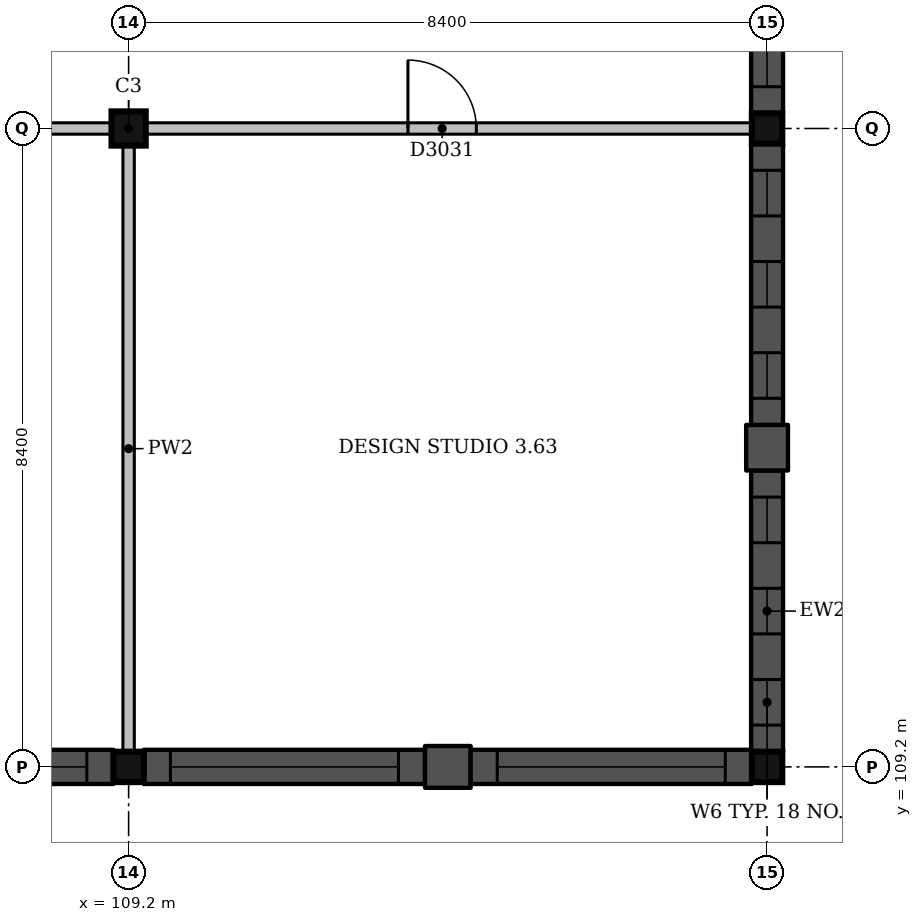
"""IFC4 building model, lengths in metres.
Left out: names, types, materials, properties, quantities, classifications, styles, units other than length and angle.
Written with IfcOpenShell. Run it as: python <this file> out.ifc"""

import sys

from ifc_helpers import new_model, si_unit, direction, frame, frame_2d, origin, origin_2d, place, context, subcontext, project, spatial, rectangle, extrude, element, fill, save


model = new_model("IFC4")
c1 = context("Model", 3, precision=1e-05, world=origin(), true_north=direction((0.0, 1.0)))
c2 = subcontext(c1, "Body", "Model", "MODEL_VIEW")
j1 = project(units=[si_unit("LENGTHUNIT", "METRE"), si_unit("PLANEANGLEUNIT", "RADIAN")], contexts=[c1])
p1 = place(None, origin())
s1 = spatial("IfcSite", under=j1, at=p1, CompositionType="ELEMENT")
p2 = place(p1, origin())
s2 = spatial("IfcBuilding", under=s1, at=p2, CompositionType="ELEMENT")
p3 = place(p2, frame((0.0, 0.0, 13.5)))
s3 = spatial("IfcBuildingStorey", under=s2, at=p3, CompositionType="ELEMENT", Elevation=13.5)
p4 = place(p3, frame((109.2, 109.2, 0.0), z_axis=(0.0, 0.0, 1.0), x_axis=(1.0, 0.0, 0.0)))
e1 = element("IfcColumn", 1, at=p4, inside=s3, PredefinedType="COLUMN", context=c2, shape_type="SweptSolid", body=[
    extrude(rectangle(XDim=0.4, YDim=0.4, at=origin_2d()), origin(), (0.0, 0.0, 1.0), 4.5),
])
p5 = place(p3, frame((109.2, 117.6, 0.0), z_axis=(0.0, 0.0, 1.0), x_axis=(1.0, 0.0, 0.0)))
e2 = element("IfcColumn", 2, at=p5, inside=s3, PredefinedType="COLUMN", context=c2, shape_type="SweptSolid", body=[
    extrude(rectangle(XDim=0.45, YDim=0.45, at=origin_2d()), origin(), (0.0, 0.0, 1.0), 4.5),
])
for number, where, z_axis, x_axis in (
    (3, (117.6, 109.2, 0.0), (0.0, 0.0, 1.0), (1.0, 0.0, 0.0)),
    (4, (117.6, 117.6, 0.0), (0.0, 0.0, 1.0), (1.0, 0.0, 0.0)),
):
    element("IfcColumn", number, at=place(p3, frame(where, z_axis=z_axis, x_axis=x_axis)), inside=s3, PredefinedType="COLUMN", context=c2, shape_type="SweptSolid", body=[
        extrude(rectangle(XDim=0.4, YDim=0.4, at=origin_2d()), origin(), (0.0, 0.0, 1.0), 4.5),
    ])
p6 = place(p3, frame((105.3, 109.2, 0.0), z_axis=(0.0, 0.0, 1.0), x_axis=(1.0, 0.0, 0.0)))
e5 = element("IfcWall", 5, at=p6, inside=s3, PredefinedType="SOLIDWALL", context=c2, shape_type="SweptSolid", body=[
    extrude(rectangle(XDim=3.7, YDim=0.45, at=frame_2d((1.85, 0.0))), origin(), (0.0, 0.0, 1.0), 3.45),
])
p7 = place(p6, frame((0.35, 0.0, 0.9)))
e6 = element("IfcOpeningElement", 6, at=p7, cuts=e5, PredefinedType="OPENING", context=c2, shape_type="SweptSolid", body=[
    extrude(rectangle(XDim=3.0, YDim=2.1, at=frame_2d((1.5, 1.05))), frame((0.0, 0.235, 0.0), z_axis=(0.0, -1.0, 0.0), x_axis=(1.0, 0.0, 0.0)), (0.0, 0.0, 1.0), 0.47),
])
p8 = place(p3, frame((109.4, 109.2, 0.0), z_axis=(0.0, 0.0, 1.0), x_axis=(1.0, 0.0, 0.0)))
e7 = element("IfcWall", 7, at=p8, inside=s3, PredefinedType="SOLIDWALL", context=c2, shape_type="SweptSolid", body=[
    extrude(rectangle(XDim=3.7, YDim=0.45, at=frame_2d((1.85, 0.0))), origin(), (0.0, 0.0, 1.0), 3.45),
])
p9 = place(p8, frame((0.35, 0.0, 0.9)))
e8 = element("IfcOpeningElement", 8, at=p9, cuts=e7, PredefinedType="OPENING", context=c2, shape_type="SweptSolid", body=[
    extrude(rectangle(XDim=3.0, YDim=2.1, at=frame_2d((1.5, 1.05))), frame((0.0, 0.235, 0.0), z_axis=(0.0, -1.0, 0.0), x_axis=(1.0, 0.0, 0.0)), (0.0, 0.0, 1.0), 0.47),
])
p10 = place(p3, frame((113.1, 109.2, 0.0), z_axis=(0.0, 0.0, 1.0), x_axis=(1.0, 0.0, 0.0)))
e9 = element("IfcWall", 9, at=p10, inside=s3, PredefinedType="SOLIDWALL", context=c2, shape_type="SweptSolid", body=[
    extrude(rectangle(XDim=0.6, YDim=0.55, at=frame_2d((0.3, 0.0))), origin(), (0.0, 0.0, 1.0), 3.45),
])
p11 = place(p3, frame((113.7, 109.2, 0.0), z_axis=(0.0, 0.0, 1.0), x_axis=(1.0, 0.0, 0.0)))
e10 = element("IfcWall", 10, at=p11, inside=s3, PredefinedType="SOLIDWALL", context=c2, shape_type="SweptSolid", body=[
    extrude(rectangle(XDim=3.7, YDim=0.45, at=frame_2d((1.85, 0.0))), origin(), (0.0, 0.0, 1.0), 3.45),
])
p12 = place(p11, frame((0.35, 0.0, 0.9)))
e11 = element("IfcOpeningElement", 11, at=p12, cuts=e10, PredefinedType="OPENING", context=c2, shape_type="SweptSolid", body=[
    extrude(rectangle(XDim=3.0, YDim=2.1, at=frame_2d((1.5, 1.05))), frame((0.0, 0.235, 0.0), z_axis=(0.0, -1.0, 0.0), x_axis=(1.0, 0.0, 0.0)), (0.0, 0.0, 1.0), 0.47),
])
p13 = place(p3, frame((117.6, 109.4, 0.0), z_axis=(0.0, 0.0, 1.0), x_axis=(0.0, 1.0, 0.0)))
e12 = element("IfcWall", 12, at=p13, inside=s3, PredefinedType="SOLIDWALL", context=c2, shape_type="SweptSolid", body=[
    extrude(rectangle(XDim=3.7, YDim=0.42, at=frame_2d((1.85, 0.0))), origin(), (0.0, 0.0, 1.0), 4.2),
])
p14 = place(p13, frame((0.35, 0.0, 1.0)))
e13 = element("IfcOpeningElement", 13, at=p14, cuts=e12, PredefinedType="OPENING", context=c2, shape_type="SweptSolid", body=[
    extrude(rectangle(XDim=0.6, YDim=2.1, at=frame_2d((0.3, 1.05))), frame((0.0, 0.22, 0.0), z_axis=(0.0, -1.0, 0.0), x_axis=(1.0, 0.0, 0.0)), (0.0, 0.0, 1.0), 0.44),
])
p15 = place(p13, frame((1.55, 0.0, 1.0)))
e14 = element("IfcOpeningElement", 14, at=p15, cuts=e12, PredefinedType="OPENING", context=c2, shape_type="SweptSolid", body=[
    extrude(rectangle(XDim=0.6, YDim=2.1, at=frame_2d((0.3, 1.05))), frame((0.0, 0.22, 0.0), z_axis=(0.0, -1.0, 0.0), x_axis=(1.0, 0.0, 0.0)), (0.0, 0.0, 1.0), 0.44),
])
p16 = place(p13, frame((2.75, 0.0, 1.0)))
e15 = element("IfcOpeningElement", 15, at=p16, cuts=e12, PredefinedType="OPENING", context=c2, shape_type="SweptSolid", body=[
    extrude(rectangle(XDim=0.6, YDim=2.1, at=frame_2d((0.3, 1.05))), frame((0.0, 0.22, 0.0), z_axis=(0.0, -1.0, 0.0), x_axis=(1.0, 0.0, 0.0)), (0.0, 0.0, 1.0), 0.44),
])
p17 = place(p3, frame((117.6, 113.1, 0.0), z_axis=(0.0, 0.0, 1.0), x_axis=(0.0, 1.0, 0.0)))
e16 = element("IfcWall", 16, at=p17, inside=s3, PredefinedType="SOLIDWALL", context=c2, shape_type="SweptSolid", body=[
    extrude(rectangle(XDim=0.6, YDim=0.55, at=frame_2d((0.3, 0.0))), origin(), (0.0, 0.0, 1.0), 4.2),
])
p18 = place(p3, frame((117.6, 113.7, 0.0), z_axis=(0.0, 0.0, 1.0), x_axis=(0.0, 1.0, 0.0)))
e17 = element("IfcWall", 17, at=p18, inside=s3, PredefinedType="SOLIDWALL", context=c2, shape_type="SweptSolid", body=[
    extrude(rectangle(XDim=3.7, YDim=0.42, at=frame_2d((1.85, 0.0))), origin(), (0.0, 0.0, 1.0), 4.2),
])
p19 = place(p18, frame((0.35, 0.0, 1.0)))
e18 = element("IfcOpeningElement", 18, at=p19, cuts=e17, PredefinedType="OPENING", context=c2, shape_type="SweptSolid", body=[
    extrude(rectangle(XDim=0.6, YDim=2.1, at=frame_2d((0.3, 1.05))), frame((0.0, 0.22, 0.0), z_axis=(0.0, -1.0, 0.0), x_axis=(1.0, 0.0, 0.0)), (0.0, 0.0, 1.0), 0.44),
])
p20 = place(p18, frame((1.55, 0.0, 1.0)))
e19 = element("IfcOpeningElement", 19, at=p20, cuts=e17, PredefinedType="OPENING", context=c2, shape_type="SweptSolid", body=[
    extrude(rectangle(XDim=0.6, YDim=2.1, at=frame_2d((0.3, 1.05))), frame((0.0, 0.22, 0.0), z_axis=(0.0, -1.0, 0.0), x_axis=(1.0, 0.0, 0.0)), (0.0, 0.0, 1.0), 0.44),
])
p21 = place(p18, frame((2.75, 0.0, 1.0)))
e20 = element("IfcOpeningElement", 20, at=p21, cuts=e17, PredefinedType="OPENING", context=c2, shape_type="SweptSolid", body=[
    extrude(rectangle(XDim=0.6, YDim=2.1, at=frame_2d((0.3, 1.05))), frame((0.0, 0.22, 0.0), z_axis=(0.0, -1.0, 0.0), x_axis=(1.0, 0.0, 0.0)), (0.0, 0.0, 1.0), 0.44),
])
p22 = place(p3, frame((117.6, 117.8, 0.0), z_axis=(0.0, 0.0, 1.0), x_axis=(0.0, 1.0, 0.0)))
e21 = element("IfcWall", 21, at=p22, inside=s3, PredefinedType="SOLIDWALL", context=c2, shape_type="SweptSolid", body=[
    extrude(rectangle(XDim=3.7, YDim=0.42, at=frame_2d((1.85, 0.0))), origin(), (0.0, 0.0, 1.0), 3.45),
])
p23 = place(p22, frame((0.35, 0.0, 1.0)))
e22 = element("IfcOpeningElement", 22, at=p23, cuts=e21, PredefinedType="OPENING", context=c2, shape_type="SweptSolid", body=[
    extrude(rectangle(XDim=0.6, YDim=2.1, at=frame_2d((0.3, 1.05))), frame((0.0, 0.22, 0.0), z_axis=(0.0, -1.0, 0.0), x_axis=(1.0, 0.0, 0.0)), (0.0, 0.0, 1.0), 0.44),
])
p24 = place(p22, frame((1.55, 0.0, 1.0)))
e23 = element("IfcOpeningElement", 23, at=p24, cuts=e21, PredefinedType="OPENING", context=c2, shape_type="SweptSolid", body=[
    extrude(rectangle(XDim=0.6, YDim=2.1, at=frame_2d((0.3, 1.05))), frame((0.0, 0.22, 0.0), z_axis=(0.0, -1.0, 0.0), x_axis=(1.0, 0.0, 0.0)), (0.0, 0.0, 1.0), 0.44),
])
p25 = place(p22, frame((2.75, 0.0, 1.0)))
e24 = element("IfcOpeningElement", 24, at=p25, cuts=e21, PredefinedType="OPENING", context=c2, shape_type="SweptSolid", body=[
    extrude(rectangle(XDim=0.6, YDim=2.1, at=frame_2d((0.3, 1.05))), frame((0.0, 0.22, 0.0), z_axis=(0.0, -1.0, 0.0), x_axis=(1.0, 0.0, 0.0)), (0.0, 0.0, 1.0), 0.44),
])
p26 = place(p3, frame((101.025, 117.6, 0.0), z_axis=(0.0, 0.0, 1.0), x_axis=(1.0, 0.0, 0.0)))
e25 = element("IfcWall", 25, at=p26, inside=s3, PredefinedType="PARTITIONING", context=c2, shape_type="SweptSolid", body=[
    extrude(rectangle(XDim=7.95, YDim=0.15, at=frame_2d((3.975, 0.0))), origin(), (0.0, 0.0, 1.0), 3.5),
])
p27 = place(p26, frame((3.45, 0.0, 0.0)))
e26 = element("IfcOpeningElement", 26, at=p27, cuts=e25, PredefinedType="OPENING", context=c2, shape_type="SweptSolid", body=[
    extrude(rectangle(XDim=0.9, YDim=2.1, at=frame_2d((0.45, 1.05))), frame((0.0, 0.085, 0.0), z_axis=(0.0, -1.0, 0.0), x_axis=(1.0, 0.0, 0.0)), (0.0, 0.0, 1.0), 0.17),
])
p28 = place(p3, frame((109.425, 117.6, 0.0), z_axis=(0.0, 0.0, 1.0), x_axis=(1.0, 0.0, 0.0)))
e27 = element("IfcWall", 27, at=p28, inside=s3, PredefinedType="PARTITIONING", context=c2, shape_type="SweptSolid", body=[
    extrude(rectangle(XDim=7.975, YDim=0.15, at=frame_2d((3.987, 0.0))), origin(), (0.0, 0.0, 1.0), 3.5),
])
p29 = place(p28, frame((3.45, 0.0, 0.0)))
e28 = element("IfcOpeningElement", 28, at=p29, cuts=e27, PredefinedType="OPENING", context=c2, shape_type="SweptSolid", body=[
    extrude(rectangle(XDim=0.9, YDim=2.1, at=frame_2d((0.45, 1.05))), frame((0.0, 0.085, 0.0), z_axis=(0.0, -1.0, 0.0), x_axis=(1.0, 0.0, 0.0)), (0.0, 0.0, 1.0), 0.17),
])
p30 = place(p3, frame((109.2, 109.4, 0.0), z_axis=(0.0, 0.0, 1.0), x_axis=(0.0, 1.0, 0.0)))
e29 = element("IfcWall", 29, at=p30, inside=s3, PredefinedType="PARTITIONING", context=c2, shape_type="SweptSolid", body=[
    extrude(rectangle(XDim=7.975, YDim=0.15, at=frame_2d((3.988, 0.0))), origin(), (0.0, 0.0, 1.0), 4.15),
])
p31 = place(p7, origin())
e30 = element("IfcWindow", 30, at=p31, inside=s3, PartitioningType="SINGLE_PANEL", PredefinedType="WINDOW", context=c2, shape_type="SweptSolid", body=[
    extrude(rectangle(XDim=3.0, YDim=2.1, at=frame_2d((1.5, 1.05))), frame((0.0, 0.135, 0.0), z_axis=(0.0, -1.0, 0.0), x_axis=(1.0, 0.0, 0.0)), (0.0, 0.0, 1.0), 0.06),
])
fill(e6, e30)
p32 = place(p9, origin())
e31 = element("IfcWindow", 31, at=p32, inside=s3, PartitioningType="SINGLE_PANEL", PredefinedType="WINDOW", context=c2, shape_type="SweptSolid", body=[
    extrude(rectangle(XDim=3.0, YDim=2.1, at=frame_2d((1.5, 1.05))), frame((0.0, 0.135, 0.0), z_axis=(0.0, -1.0, 0.0), x_axis=(1.0, 0.0, 0.0)), (0.0, 0.0, 1.0), 0.06),
])
fill(e8, e31)
p33 = place(p12, origin())
e32 = element("IfcWindow", 32, at=p33, inside=s3, PartitioningType="SINGLE_PANEL", PredefinedType="WINDOW", context=c2, shape_type="SweptSolid", body=[
    extrude(rectangle(XDim=3.0, YDim=2.1, at=frame_2d((1.5, 1.05))), frame((0.0, 0.135, 0.0), z_axis=(0.0, -1.0, 0.0), x_axis=(1.0, 0.0, 0.0)), (0.0, 0.0, 1.0), 0.06),
])
fill(e11, e32)
p34 = place(p14, origin())
e33 = element("IfcWindow", 33, at=p34, inside=s3, PartitioningType="SINGLE_PANEL", PredefinedType="WINDOW", context=c2, shape_type="SweptSolid", body=[
    extrude(rectangle(XDim=0.6, YDim=2.1, at=frame_2d((0.3, 1.05))), frame((0.0, 0.15, 0.0), z_axis=(0.0, -1.0, 0.0), x_axis=(1.0, 0.0, 0.0)), (0.0, 0.0, 1.0), 0.06),
])
fill(e13, e33)
p35 = place(p15, origin())
e34 = element("IfcWindow", 34, at=p35, inside=s3, PartitioningType="SINGLE_PANEL", PredefinedType="WINDOW", context=c2, shape_type="SweptSolid", body=[
    extrude(rectangle(XDim=0.6, YDim=2.1, at=frame_2d((0.3, 1.05))), frame((0.0, 0.15, 0.0), z_axis=(0.0, -1.0, 0.0), x_axis=(1.0, 0.0, 0.0)), (0.0, 0.0, 1.0), 0.06),
])
fill(e14, e34)
p36 = place(p16, origin())
e35 = element("IfcWindow", 35, at=p36, inside=s3, PartitioningType="SINGLE_PANEL", PredefinedType="WINDOW", context=c2, shape_type="SweptSolid", body=[
    extrude(rectangle(XDim=0.6, YDim=2.1, at=frame_2d((0.3, 1.05))), frame((0.0, 0.15, 0.0), z_axis=(0.0, -1.0, 0.0), x_axis=(1.0, 0.0, 0.0)), (0.0, 0.0, 1.0), 0.06),
])
fill(e15, e35)
p37 = place(p19, origin())
e36 = element("IfcWindow", 36, at=p37, inside=s3, PartitioningType="SINGLE_PANEL", PredefinedType="WINDOW", context=c2, shape_type="SweptSolid", body=[
    extrude(rectangle(XDim=0.6, YDim=2.1, at=frame_2d((0.3, 1.05))), frame((0.0, 0.15, 0.0), z_axis=(0.0, -1.0, 0.0), x_axis=(1.0, 0.0, 0.0)), (0.0, 0.0, 1.0), 0.06),
])
fill(e18, e36)
p38 = place(p20, origin())
e37 = element("IfcWindow", 37, at=p38, inside=s3, PartitioningType="SINGLE_PANEL", PredefinedType="WINDOW", context=c2, shape_type="SweptSolid", body=[
    extrude(rectangle(XDim=0.6, YDim=2.1, at=frame_2d((0.3, 1.05))), frame((0.0, 0.15, 0.0), z_axis=(0.0, -1.0, 0.0), x_axis=(1.0, 0.0, 0.0)), (0.0, 0.0, 1.0), 0.06),
])
fill(e19, e37)
p39 = place(p21, origin())
e38 = element("IfcWindow", 38, at=p39, inside=s3, PartitioningType="SINGLE_PANEL", PredefinedType="WINDOW", context=c2, shape_type="SweptSolid", body=[
    extrude(rectangle(XDim=0.6, YDim=2.1, at=frame_2d((0.3, 1.05))), frame((0.0, 0.15, 0.0), z_axis=(0.0, -1.0, 0.0), x_axis=(1.0, 0.0, 0.0)), (0.0, 0.0, 1.0), 0.06),
])
fill(e20, e38)
p40 = place(p23, origin())
e39 = element("IfcWindow", 39, at=p40, inside=s3, PartitioningType="SINGLE_PANEL", PredefinedType="WINDOW", context=c2, shape_type="SweptSolid", body=[
    extrude(rectangle(XDim=0.6, YDim=2.1, at=frame_2d((0.3, 1.05))), frame((0.0, 0.15, 0.0), z_axis=(0.0, -1.0, 0.0), x_axis=(1.0, 0.0, 0.0)), (0.0, 0.0, 1.0), 0.06),
])
fill(e22, e39)
p41 = place(p29, origin())
e40 = element("IfcDoor", 40, at=p41, inside=s3, OperationType="SINGLE_SWING_LEFT", PredefinedType="DOOR", context=c2, shape_type="SweptSolid", body=[
    extrude(rectangle(XDim=0.9, YDim=2.1, at=frame_2d((0.45, 1.05))), frame((0.0, 0.025, 0.0), z_axis=(0.0, -1.0, 0.0), x_axis=(1.0, 0.0, 0.0)), (0.0, 0.0, 1.0), 0.05),
])
fill(e28, e40)
save(model, sys.argv[1])
